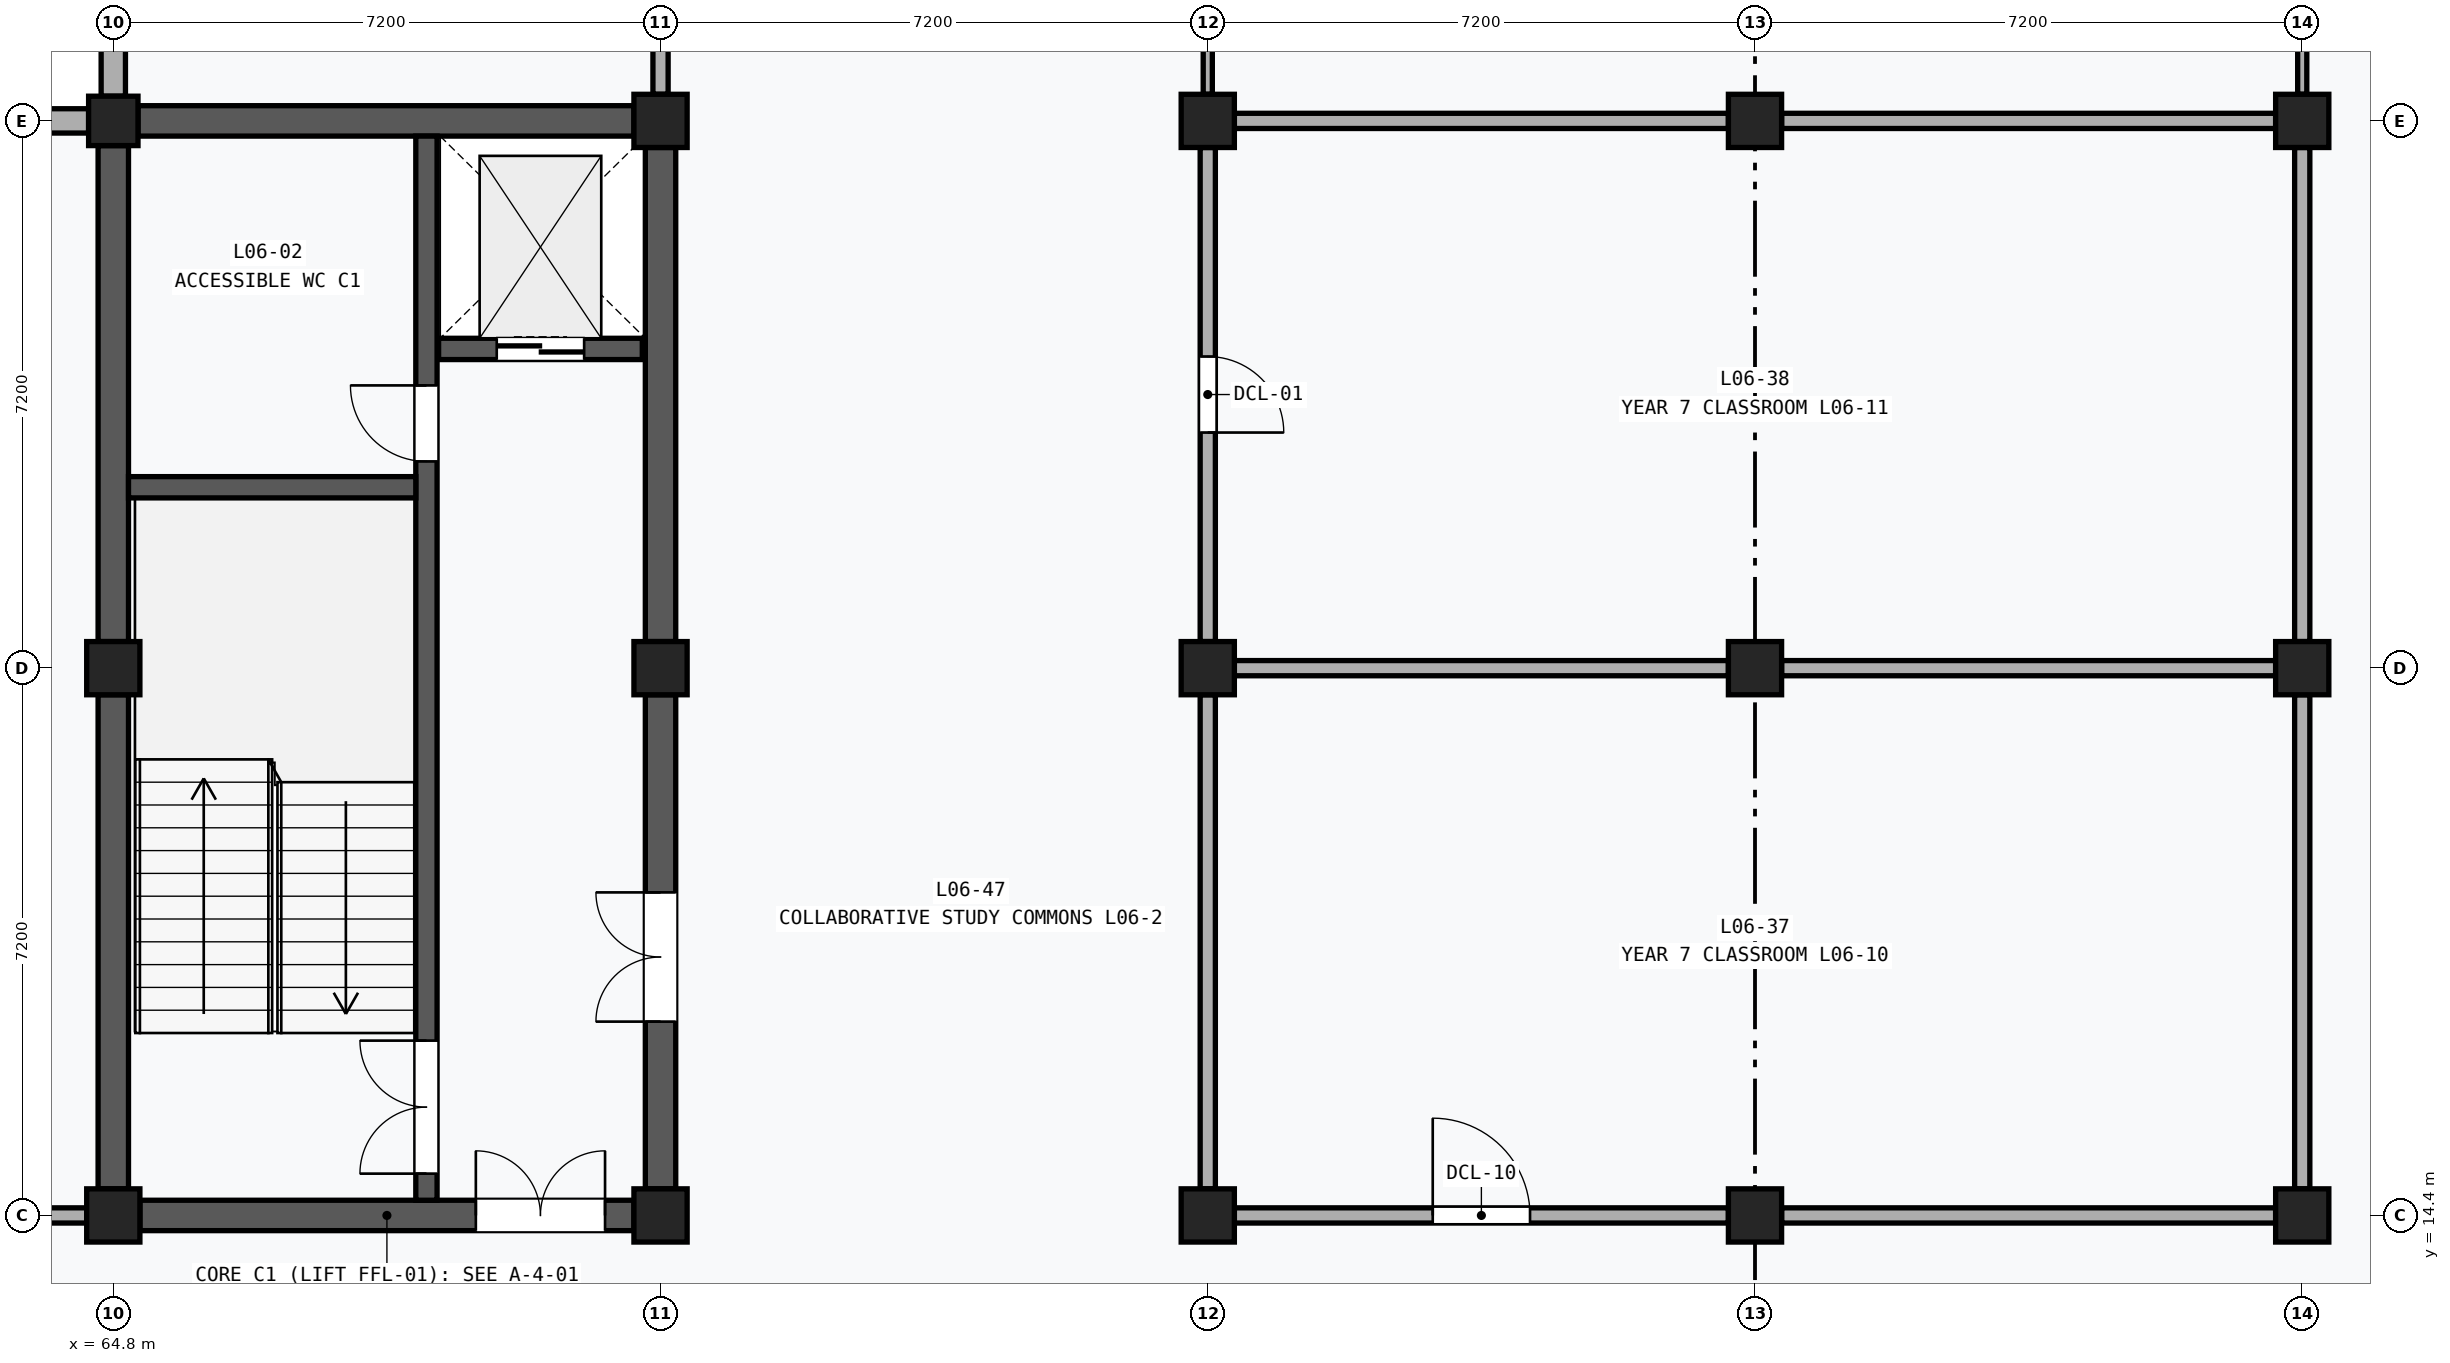
"""IFC4 building model, lengths in metres.
Left out: names, types, materials, properties, quantities, classifications, styles, units other than length and angle.
Written with IfcOpenShell. Run it as: python <this file> out.ifc"""

import sys

from ifc_helpers import new_model, si_unit, direction, frame, frame_2d, origin, origin_2d, place, context, subcontext, project, spatial, rectangle, extrude, element, fill, save


model = new_model("IFC4")
c1 = context("Model", 3, precision=1e-05, world=origin(), true_north=direction((0.0, 1.0)))
c2 = subcontext(c1, "Body", "Model", "MODEL_VIEW")
j1 = project(units=[si_unit("LENGTHUNIT", "METRE"), si_unit("PLANEANGLEUNIT", "RADIAN")], contexts=[c1])
p1 = place(None, origin())
s1 = spatial("IfcSite", under=j1, at=p1, CompositionType="ELEMENT")
p2 = place(p1, origin())
s2 = spatial("IfcBuilding", under=s1, at=p2, CompositionType="ELEMENT")
p3 = place(p2, frame((0.0, 0.0, 26.6)))
s3 = spatial("IfcBuildingStorey", under=s2, at=p3, CompositionType="ELEMENT", Elevation=26.6)
for number, where, z_axis, x_axis in (
    (1, (64.8, 14.4, 0.0), (0.0, 0.0, 1.0), (1.0, 0.0, 0.0)),
    (2, (64.8, 21.6, 0.0), (0.0, 0.0, 1.0), (1.0, 0.0, 0.0)),
):
    element("IfcColumn", number, at=place(p3, frame(where, z_axis=z_axis, x_axis=x_axis)), inside=s3, PredefinedType="COLUMN", context=c2, shape_type="SweptSolid", body=[
        extrude(rectangle(XDim=0.7, YDim=0.7, at=origin_2d()), origin(), (0.0, 0.0, 1.0), 4.0),
    ])
p4 = place(p3, frame((64.8, 28.8, 0.0), z_axis=(0.0, 0.0, 1.0), x_axis=(1.0, 0.0, 0.0)))
e3 = element("IfcColumn", 3, at=p4, inside=s3, PredefinedType="COLUMN", context=c2, shape_type="SweptSolid", body=[
    extrude(rectangle(XDim=0.65, YDim=0.65, at=origin_2d()), origin(), (0.0, 0.0, 1.0), 4.0),
])
for number, where, z_axis, x_axis in (
    (4, (72.0, 14.4, 0.0), (0.0, 0.0, 1.0), (1.0, 0.0, 0.0)),
    (5, (72.0, 21.6, 0.0), (0.0, 0.0, 1.0), (1.0, 0.0, 0.0)),
    (6, (72.0, 28.8, 0.0), (0.0, 0.0, 1.0), (1.0, 0.0, 0.0)),
    (7, (79.2, 14.4, 0.0), (0.0, 0.0, 1.0), (1.0, 0.0, 0.0)),
    (8, (79.2, 21.6, 0.0), (0.0, 0.0, 1.0), (1.0, 0.0, 0.0)),
    (9, (79.2, 28.8, 0.0), (0.0, 0.0, 1.0), (1.0, 0.0, 0.0)),
    (10, (86.4, 14.4, 0.0), (0.0, 0.0, 1.0), (1.0, 0.0, 0.0)),
    (11, (86.4, 21.6, 0.0), (0.0, 0.0, 1.0), (1.0, 0.0, 0.0)),
    (12, (86.4, 28.8, 0.0), (0.0, 0.0, 1.0), (1.0, 0.0, 0.0)),
    (13, (93.6, 14.4, 0.0), (0.0, 0.0, 1.0), (1.0, 0.0, 0.0)),
    (14, (93.6, 21.6, 0.0), (0.0, 0.0, 1.0), (1.0, 0.0, 0.0)),
    (15, (93.6, 28.8, 0.0), (0.0, 0.0, 1.0), (1.0, 0.0, 0.0)),
):
    element("IfcColumn", number, at=place(p3, frame(where, z_axis=z_axis, x_axis=x_axis)), inside=s3, PredefinedType="COLUMN", context=c2, shape_type="SweptSolid", body=[
        extrude(rectangle(XDim=0.7, YDim=0.7, at=origin_2d()), origin(), (0.0, 0.0, 1.0), 4.0),
    ])
p5 = place(p3, frame((57.925, 28.8, 0.0), z_axis=(0.0, 0.0, 1.0), x_axis=(1.0, 0.0, 0.0)))
e16 = element("IfcWall", 16, at=p5, inside=s3, PredefinedType="SOLIDWALL", context=c2, shape_type="SweptSolid", body=[
    extrude(rectangle(XDim=6.55, YDim=0.32, at=frame_2d((3.275, 0.0))), origin(), (0.0, 0.0, 1.0), 3.1),
])
p6 = place(p5, frame((1.675, 0.0, 0.9)))
e17 = element("IfcOpeningElement", 17, at=p6, cuts=e16, PredefinedType="OPENING", context=c2, shape_type="SweptSolid", body=[
    extrude(rectangle(XDim=3.2, YDim=1.8, at=frame_2d((1.6, 0.9))), frame((0.0, 0.172, 0.0), z_axis=(0.0, -1.0, 0.0), x_axis=(1.0, 0.0, 0.0)), (0.0, 0.0, 1.0), 0.344),
])
p7 = place(p3, frame((64.8, 29.125, 0.0), z_axis=(0.0, 0.0, 1.0), x_axis=(0.0, 1.0, 0.0)))
e18 = element("IfcWall", 18, at=p7, inside=s3, PredefinedType="SOLIDWALL", context=c2, shape_type="SweptSolid", body=[
    extrude(rectangle(XDim=6.55, YDim=0.32, at=frame_2d((3.275, 0.0))), origin(), (0.0, 0.0, 1.0), 3.1),
])
p8 = place(p7, frame((1.575, 0.0, 0.9)))
e19 = element("IfcOpeningElement", 19, at=p8, cuts=e18, PredefinedType="OPENING", context=c2, shape_type="SweptSolid", body=[
    extrude(rectangle(XDim=3.4, YDim=1.8, at=frame_2d((1.7, 0.9))), frame((0.0, 0.172, 0.0), z_axis=(0.0, -1.0, 0.0), x_axis=(1.0, 0.0, 0.0)), (0.0, 0.0, 1.0), 0.344),
])
p9 = place(p3, frame((64.8, 14.75, 0.0), z_axis=(0.0, 0.0, 1.0), x_axis=(0.0, 1.0, 0.0)))
e20 = element("IfcWall", 20, at=p9, inside=s3, PredefinedType="SHEAR", context=c2, shape_type="SweptSolid", body=[
    extrude(rectangle(XDim=6.5, YDim=0.4, at=frame_2d((3.25, 0.0))), origin(), (0.0, 0.0, 1.0), 2.96),
])
p10 = place(p3, frame((64.8, 21.95, 0.0), z_axis=(0.0, 0.0, 1.0), x_axis=(0.0, 1.0, 0.0)))
e21 = element("IfcWall", 21, at=p10, inside=s3, PredefinedType="SHEAR", context=c2, shape_type="SweptSolid", body=[
    extrude(rectangle(XDim=6.525, YDim=0.4, at=frame_2d((3.263, 0.0))), origin(), (0.0, 0.0, 1.0), 2.96),
])
p11 = place(p3, frame((72.0, 14.75, 0.0), z_axis=(0.0, 0.0, 1.0), x_axis=(0.0, 1.0, 0.0)))
e22 = element("IfcWall", 22, at=p11, inside=s3, PredefinedType="SHEAR", context=c2, shape_type="SweptSolid", body=[
    extrude(rectangle(XDim=6.5, YDim=0.4, at=frame_2d((3.25, 0.0))), origin(), (0.0, 0.0, 1.0), 2.96),
])
p12 = place(p11, frame((2.2, 0.0, 0.0)))
e23 = element("IfcOpeningElement", 23, at=p12, cuts=e22, PredefinedType="OPENING", context=c2, shape_type="SweptSolid", body=[
    extrude(rectangle(XDim=1.7, YDim=2.25, at=frame_2d((0.85, 1.125))), frame((0.0, 0.212, 0.0), z_axis=(0.0, -1.0, 0.0), x_axis=(1.0, 0.0, 0.0)), (0.0, 0.0, 1.0), 0.424),
])
p13 = place(p3, frame((72.0, 21.95, 0.0), z_axis=(0.0, 0.0, 1.0), x_axis=(0.0, 1.0, 0.0)))
e24 = element("IfcWall", 24, at=p13, inside=s3, PredefinedType="SHEAR", context=c2, shape_type="SweptSolid", body=[
    extrude(rectangle(XDim=6.5, YDim=0.4, at=frame_2d((3.25, 0.0))), origin(), (0.0, 0.0, 1.0), 2.96),
])
p14 = place(p3, frame((65.15, 14.4, 0.0), z_axis=(0.0, 0.0, 1.0), x_axis=(1.0, 0.0, 0.0)))
e25 = element("IfcWall", 25, at=p14, inside=s3, PredefinedType="SHEAR", context=c2, shape_type="SweptSolid", body=[
    extrude(rectangle(XDim=6.5, YDim=0.4, at=frame_2d((3.25, 0.0))), origin(), (0.0, 0.0, 1.0), 2.96),
])
p15 = place(p14, frame((4.42, 0.0, 0.0)))
e26 = element("IfcOpeningElement", 26, at=p15, cuts=e25, PredefinedType="OPENING", context=c2, shape_type="SweptSolid", body=[
    extrude(rectangle(XDim=1.7, YDim=2.25, at=frame_2d((0.85, 1.125))), frame((0.0, 0.212, 0.0), z_axis=(0.0, -1.0, 0.0), x_axis=(1.0, 0.0, 0.0)), (0.0, 0.0, 1.0), 0.424),
])
p16 = place(p3, frame((65.125, 28.8, 0.0), z_axis=(0.0, 0.0, 1.0), x_axis=(1.0, 0.0, 0.0)))
e27 = element("IfcWall", 27, at=p16, inside=s3, PredefinedType="SHEAR", context=c2, shape_type="SweptSolid", body=[
    extrude(rectangle(XDim=6.525, YDim=0.4, at=frame_2d((3.262, 0.0))), origin(), (0.0, 0.0, 1.0), 2.96),
])
p17 = place(p3, frame((68.92, 14.6, 0.0), z_axis=(0.0, 0.0, 1.0), x_axis=(0.0, 1.0, 0.0)))
e28 = element("IfcWall", 28, at=p17, inside=s3, PredefinedType="SHEAR", context=c2, shape_type="SweptSolid", body=[
    extrude(rectangle(XDim=14.0, YDim=0.28, at=frame_2d((7.0, 0.0))), origin(), (0.0, 0.0, 1.0), 3.73),
])
p18 = place(p17, frame((0.35, 0.0, 0.0)))
e29 = element("IfcOpeningElement", 29, at=p18, cuts=e28, PredefinedType="OPENING", context=c2, shape_type="SweptSolid", body=[
    extrude(rectangle(XDim=1.75, YDim=2.15, at=frame_2d((0.875, 1.075))), frame((0.0, 0.152, 0.0), z_axis=(0.0, -1.0, 0.0), x_axis=(1.0, 0.0, 0.0)), (0.0, 0.0, 1.0), 0.304),
])
p19 = place(p17, frame((9.72, 0.0, 0.0)))
e30 = element("IfcOpeningElement", 30, at=p19, cuts=e28, PredefinedType="OPENING", context=c2, shape_type="SweptSolid", body=[
    extrude(rectangle(XDim=1.0, YDim=2.15, at=frame_2d((0.5, 1.075))), frame((0.0, 0.152, 0.0), z_axis=(0.0, -1.0, 0.0), x_axis=(1.0, 0.0, 0.0)), (0.0, 0.0, 1.0), 0.304),
])
p20 = place(p3, frame((65.0, 23.98, 0.0), z_axis=(0.0, 0.0, 1.0), x_axis=(1.0, 0.0, 0.0)))
e31 = element("IfcWall", 31, at=p20, inside=s3, PredefinedType="SHEAR", context=c2, shape_type="SweptSolid", body=[
    extrude(rectangle(XDim=3.78, YDim=0.28, at=frame_2d((1.89, 0.0))), origin(), (0.0, 0.0, 1.0), 3.73),
])
p21 = place(p3, frame((69.08, 25.8, 0.0), z_axis=(0.0, 0.0, 1.0), x_axis=(1.0, 0.0, 0.0)))
e32 = element("IfcWall", 32, at=p21, inside=s3, PredefinedType="SHEAR", context=c2, shape_type="SweptSolid", body=[
    extrude(rectangle(XDim=2.68, YDim=0.28, at=frame_2d((1.34, 0.0))), origin(), (0.0, 0.0, 1.0), 3.73),
])
p22 = place(p21, frame((0.765, 0.0, 0.0)))
e33 = element("IfcOpeningElement", 33, at=p22, cuts=e32, PredefinedType="OPENING", context=c2, shape_type="SweptSolid", body=[
    extrude(rectangle(XDim=1.15, YDim=2.2, at=frame_2d((0.575, 1.1))), frame((0.0, 0.152, 0.0), z_axis=(0.0, -1.0, 0.0), x_axis=(1.0, 0.0, 0.0)), (0.0, 0.0, 1.0), 0.304),
])
p23 = place(p3, frame((57.95, 14.4, 0.0), z_axis=(0.0, 0.0, 1.0), x_axis=(1.0, 0.0, 0.0)))
e34 = element("IfcWall", 34, at=p23, inside=s3, PredefinedType="PARTITIONING", context=c2, shape_type="SweptSolid", body=[
    extrude(rectangle(XDim=6.5, YDim=0.2, at=frame_2d((3.25, 0.0))), origin(), (0.0, 0.0, 1.0), 2.96),
])
p24 = place(p23, frame((2.74, 0.0, 0.0)))
e35 = element("IfcOpeningElement", 35, at=p24, cuts=e34, PredefinedType="OPENING", context=c2, shape_type="SweptSolid", body=[
    extrude(rectangle(XDim=1.02, YDim=2.12, at=frame_2d((0.51, 1.06))), frame((0.0, 0.112, 0.0), z_axis=(0.0, -1.0, 0.0), x_axis=(1.0, 0.0, 0.0)), (0.0, 0.0, 1.0), 0.224),
])
p25 = place(p3, frame((72.0, 29.15, 0.0), z_axis=(0.0, 0.0, 1.0), x_axis=(0.0, 1.0, 0.0)))
e36 = element("IfcWall", 36, at=p25, inside=s3, PredefinedType="PARTITIONING", context=c2, shape_type="SweptSolid", body=[
    extrude(rectangle(XDim=6.5, YDim=0.2, at=frame_2d((3.25, 0.0))), origin(), (0.0, 0.0, 1.0), 2.96),
])
p26 = place(p25, frame((2.65, 0.0, 0.0)))
e37 = element("IfcOpeningElement", 37, at=p26, cuts=e36, PredefinedType="OPENING", context=c2, shape_type="SweptSolid", body=[
    extrude(rectangle(XDim=1.2, YDim=2.24, at=frame_2d((0.6, 1.12))), frame((0.0, 0.112, 0.0), z_axis=(0.0, -1.0, 0.0), x_axis=(1.0, 0.0, 0.0)), (0.0, 0.0, 1.0), 0.224),
])
p27 = place(p3, frame((79.55, 14.4, 0.0), z_axis=(0.0, 0.0, 1.0), x_axis=(1.0, 0.0, 0.0)))
e38 = element("IfcWall", 38, at=p27, inside=s3, PredefinedType="PARTITIONING", context=c2, shape_type="SweptSolid", body=[
    extrude(rectangle(XDim=6.5, YDim=0.2, at=frame_2d((3.25, 0.0))), origin(), (0.0, 0.0, 1.0), 2.96),
])
p28 = place(p27, frame((2.61, 0.0, 0.0)))
e39 = element("IfcOpeningElement", 39, at=p28, cuts=e38, PredefinedType="OPENING", context=c2, shape_type="SweptSolid", body=[
    extrude(rectangle(XDim=1.28, YDim=2.28, at=frame_2d((0.64, 1.14))), frame((0.0, 0.112, 0.0), z_axis=(0.0, -1.0, 0.0), x_axis=(1.0, 0.0, 0.0)), (0.0, 0.0, 1.0), 0.224),
])
for number, where, z_axis, x_axis in (
    (40, (79.55, 21.6, 0.0), (0.0, 0.0, 1.0), (1.0, 0.0, 0.0)),
    (41, (79.2, 14.75, 0.0), (0.0, 0.0, 1.0), (0.0, 1.0, 0.0)),
    (42, (86.75, 14.4, 0.0), (0.0, 0.0, 1.0), (1.0, 0.0, 0.0)),
    (43, (86.75, 21.6, 0.0), (0.0, 0.0, 1.0), (1.0, 0.0, 0.0)),
    (44, (93.6, 14.75, 0.0), (0.0, 0.0, 1.0), (0.0, 1.0, 0.0)),
    (45, (79.55, 28.8, 0.0), (0.0, 0.0, 1.0), (1.0, 0.0, 0.0)),
):
    element("IfcWall", number, at=place(p3, frame(where, z_axis=z_axis, x_axis=x_axis)), inside=s3, PredefinedType="PARTITIONING", context=c2, shape_type="SweptSolid", body=[
        extrude(rectangle(XDim=6.5, YDim=0.2, at=frame_2d((3.25, 0.0))), origin(), (0.0, 0.0, 1.0), 2.96),
    ])
p29 = place(p3, frame((79.2, 21.95, 0.0), z_axis=(0.0, 0.0, 1.0), x_axis=(0.0, 1.0, 0.0)))
e46 = element("IfcWall", 46, at=p29, inside=s3, PredefinedType="PARTITIONING", context=c2, shape_type="SweptSolid", body=[
    extrude(rectangle(XDim=6.5, YDim=0.2, at=frame_2d((3.25, 0.0))), origin(), (0.0, 0.0, 1.0), 2.96),
])
p30 = place(p29, frame((2.75, 0.0, 0.0)))
e47 = element("IfcOpeningElement", 47, at=p30, cuts=e46, PredefinedType="OPENING", context=c2, shape_type="SweptSolid", body=[
    extrude(rectangle(XDim=1.0, YDim=2.1, at=frame_2d((0.5, 1.05))), frame((0.0, 0.112, 0.0), z_axis=(0.0, -1.0, 0.0), x_axis=(1.0, 0.0, 0.0)), (0.0, 0.0, 1.0), 0.224),
])
p31 = place(p3, frame((86.75, 28.8, 0.0), z_axis=(0.0, 0.0, 1.0), x_axis=(1.0, 0.0, 0.0)))
e48 = element("IfcWall", 48, at=p31, inside=s3, PredefinedType="PARTITIONING", context=c2, shape_type="SweptSolid", body=[
    extrude(rectangle(XDim=6.5, YDim=0.2, at=frame_2d((3.25, 0.0))), origin(), (0.0, 0.0, 1.0), 3.03),
])
p32 = place(p3, frame((93.6, 21.95, 0.0), z_axis=(0.0, 0.0, 1.0), x_axis=(0.0, 1.0, 0.0)))
e49 = element("IfcWall", 49, at=p32, inside=s3, PredefinedType="PARTITIONING", context=c2, shape_type="SweptSolid", body=[
    extrude(rectangle(XDim=6.5, YDim=0.2, at=frame_2d((3.25, 0.0))), origin(), (0.0, 0.0, 1.0), 2.96),
])
p33 = place(p3, frame((79.2, 29.15, 0.0), z_axis=(0.0, 0.0, 1.0), x_axis=(0.0, 1.0, 0.0)))
e50 = element("IfcWall", 50, at=p33, inside=s3, PredefinedType="MOVABLE", context=c2, shape_type="SweptSolid", body=[
    extrude(rectangle(XDim=6.5, YDim=0.12, at=frame_2d((3.25, 0.0))), origin(), (0.0, 0.0, 1.0), 2.96),
])
p34 = place(p33, frame((2.74, 0.0, 0.0)))
e51 = element("IfcOpeningElement", 51, at=p34, cuts=e50, PredefinedType="OPENING", context=c2, shape_type="SweptSolid", body=[
    extrude(rectangle(XDim=1.02, YDim=2.12, at=frame_2d((0.51, 1.06))), frame((0.0, 0.072, 0.0), z_axis=(0.0, -1.0, 0.0), x_axis=(1.0, 0.0, 0.0)), (0.0, 0.0, 1.0), 0.144),
])
p35 = place(p3, frame((93.6, 29.15, 0.0), z_axis=(0.0, 0.0, 1.0), x_axis=(0.0, 1.0, 0.0)))
e52 = element("IfcWall", 52, at=p35, inside=s3, PredefinedType="MOVABLE", context=c2, shape_type="SweptSolid", body=[
    extrude(rectangle(XDim=6.5, YDim=0.12, at=frame_2d((3.25, 0.0))), origin(), (0.0, 0.0, 1.0), 2.96),
])
p36 = place(p12, origin())
e53 = element("IfcDoor", 53, at=p36, inside=s3, OperationType="DOUBLE_DOOR_SINGLE_SWING", PredefinedType="DOOR", context=c2, shape_type="SweptSolid", body=[
    extrude(rectangle(XDim=1.7, YDim=2.25, at=frame_2d((0.85, 1.125))), frame((0.0, 0.025, 0.0), z_axis=(0.0, -1.0, 0.0), x_axis=(1.0, 0.0, 0.0)), (0.0, 0.0, 1.0), 0.05),
])
fill(e23, e53)
p37 = place(p15, origin())
e54 = element("IfcDoor", 54, at=p37, inside=s3, OperationType="DOUBLE_DOOR_SINGLE_SWING", PredefinedType="DOOR", context=c2, shape_type="SweptSolid", body=[
    extrude(rectangle(XDim=1.7, YDim=2.25, at=frame_2d((0.85, 1.125))), frame((0.0, 0.025, 0.0), z_axis=(0.0, -1.0, 0.0), x_axis=(1.0, 0.0, 0.0)), (0.0, 0.0, 1.0), 0.05),
])
fill(e26, e54)
p38 = place(p18, origin())
e55 = element("IfcDoor", 55, at=p38, inside=s3, OperationType="DOUBLE_DOOR_SINGLE_SWING", PredefinedType="DOOR", context=c2, shape_type="SweptSolid", body=[
    extrude(rectangle(XDim=1.75, YDim=2.15, at=frame_2d((0.875, 1.075))), frame((0.0, 0.025, 0.0), z_axis=(0.0, -1.0, 0.0), x_axis=(1.0, 0.0, 0.0)), (0.0, 0.0, 1.0), 0.05),
])
fill(e29, e55)
p39 = place(p19, origin())
e56 = element("IfcDoor", 56, at=p39, inside=s3, OperationType="SINGLE_SWING_RIGHT", PredefinedType="DOOR", context=c2, shape_type="SweptSolid", body=[
    extrude(rectangle(XDim=1.0, YDim=2.15, at=frame_2d((0.5, 1.075))), frame((0.0, 0.025, 0.0), z_axis=(0.0, -1.0, 0.0), x_axis=(1.0, 0.0, 0.0)), (0.0, 0.0, 1.0), 0.05),
])
fill(e30, e56)
p40 = place(p22, frame((1.15, 0.0, 0.0), z_axis=(0.0, 0.0, 1.0), x_axis=(-1.0, 0.0, 0.0)))
e57 = element("IfcDoor", 57, at=p40, inside=s3, OperationType="DOUBLE_DOOR_SLIDING", PredefinedType="DOOR", context=c2, shape_type="SweptSolid", body=[
    extrude(rectangle(XDim=1.15, YDim=2.2, at=frame_2d((0.575, 1.1))), frame((0.0, 0.025, 0.0), z_axis=(0.0, -1.0, 0.0), x_axis=(1.0, 0.0, 0.0)), (0.0, 0.0, 1.0), 0.05),
])
fill(e33, e57)
p41 = place(p28, origin())
e58 = element("IfcDoor", 58, at=p41, inside=s3, OperationType="SINGLE_SWING_LEFT", PredefinedType="DOOR", context=c2, shape_type="SweptSolid", body=[
    extrude(rectangle(XDim=1.28, YDim=2.28, at=frame_2d((0.64, 1.14))), frame((0.0, 0.025, 0.0), z_axis=(0.0, -1.0, 0.0), x_axis=(1.0, 0.0, 0.0)), (0.0, 0.0, 1.0), 0.05),
])
fill(e39, e58)
p42 = place(p30, frame((1.0, 0.0, 0.0), z_axis=(0.0, 0.0, 1.0), x_axis=(-1.0, 0.0, 0.0)))
e59 = element("IfcDoor", 59, at=p42, inside=s3, OperationType="SINGLE_SWING_RIGHT", PredefinedType="DOOR", context=c2, shape_type="SweptSolid", body=[
    extrude(rectangle(XDim=1.0, YDim=2.1, at=frame_2d((0.5, 1.05))), frame((0.0, 0.025, 0.0), z_axis=(0.0, -1.0, 0.0), x_axis=(1.0, 0.0, 0.0)), (0.0, 0.0, 1.0), 0.05),
])
fill(e47, e59)
save(model, sys.argv[1])
